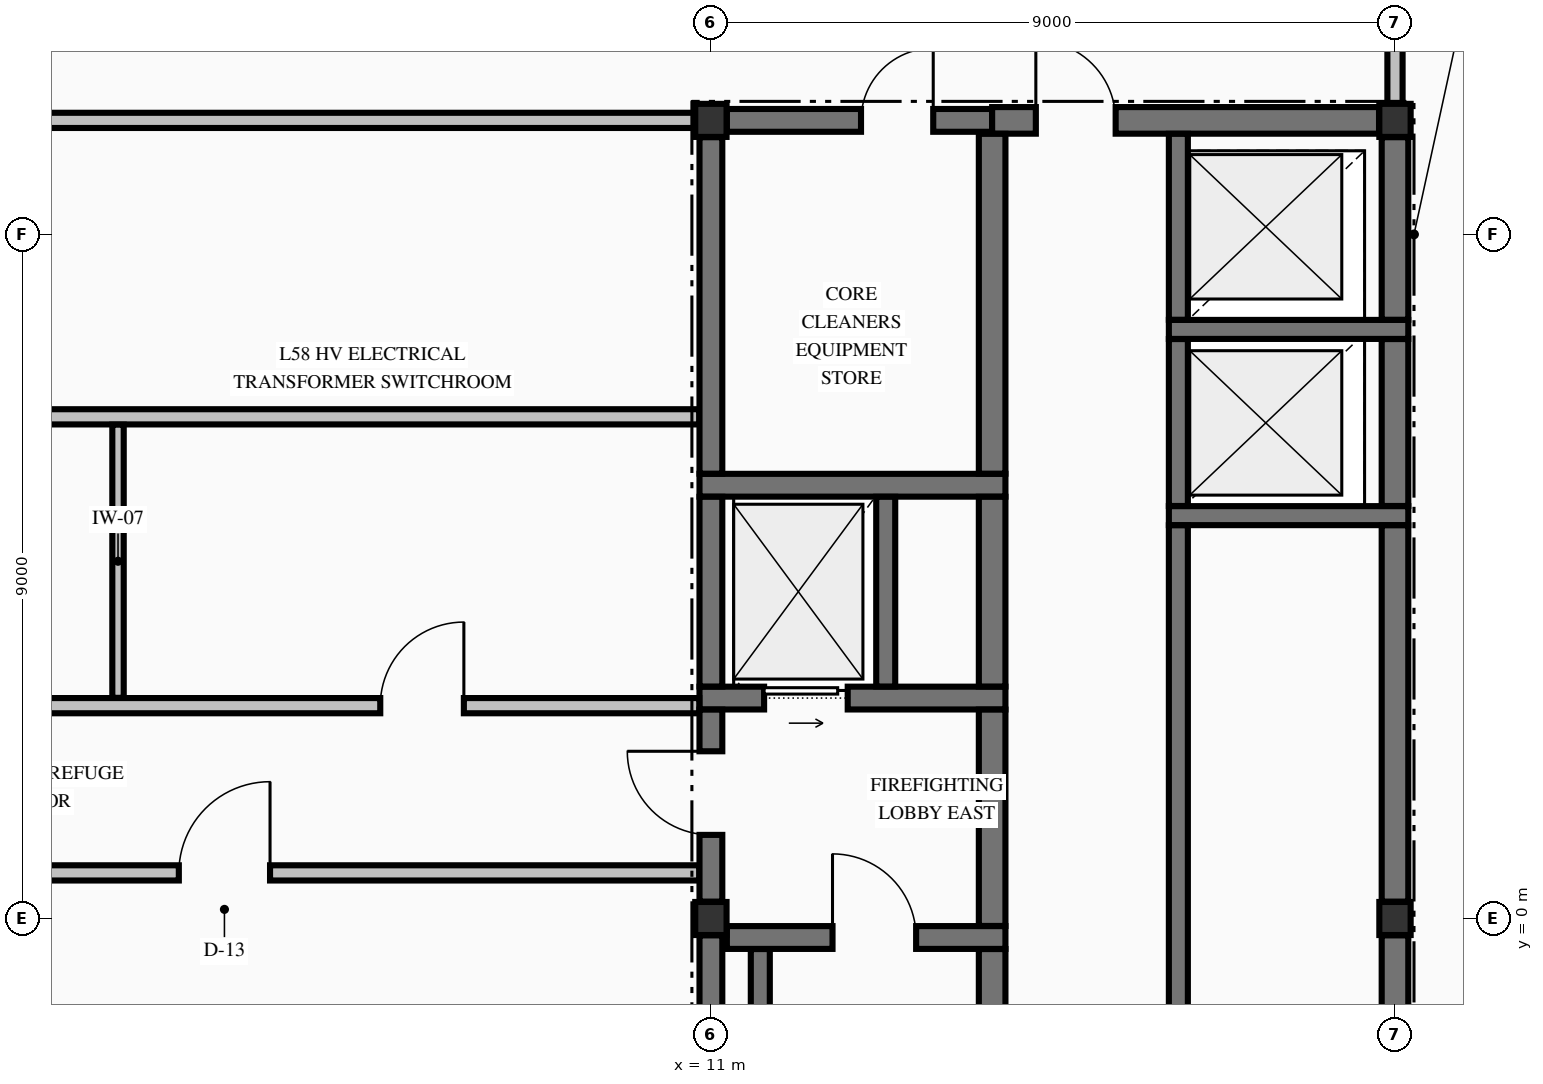
"""IFC4 building model, lengths in metres.
Left out: names, types, materials, properties, quantities, classifications, styles, units other than length and angle.
Written with IfcOpenShell. Run it as: python <this file> out.ifc"""

import sys

from ifc_helpers import new_model, si_unit, direction, frame, frame_2d, origin, origin_2d, place, context, subcontext, project, spatial, rectangle, i_section, extrude, element, fill, save


model = new_model("IFC4")
c1 = context("Model", 3, precision=1e-05, world=origin(), true_north=direction((0.0, 1.0)))
c2 = subcontext(c1, "Body", "Model", "MODEL_VIEW")
j1 = project(units=[si_unit("LENGTHUNIT", "METRE"), si_unit("PLANEANGLEUNIT", "RADIAN")], contexts=[c1])
p1 = place(None, origin())
s1 = spatial("IfcSite", under=j1, at=p1, CompositionType="ELEMENT")
p2 = place(p1, origin())
s2 = spatial("IfcBuilding", under=s1, at=p2, CompositionType="ELEMENT")
p3 = place(p2, frame((0.0, 0.0, 222.06)))
s3 = spatial("IfcBuildingStorey", under=s2, at=p3, CompositionType="ELEMENT", Elevation=222.06)
for number, where, z_axis, x_axis in (
    (1, (11.0, 0.0, -0.425), (0.0, 0.0, 1.0), (1.0, 0.0, 0.0)),
    (2, (11.0, 10.5, -0.425), (0.0, 0.0, 1.0), (1.0, 0.0, 0.0)),
    (3, (20.0, 10.5, -0.425), (0.0, 0.0, 1.0), (1.0, 0.0, 0.0)),
    (4, (20.0, 0.0, -0.425), (0.0, 0.0, 1.0), (1.0, 0.0, 0.0)),
):
    element("IfcColumn", number, at=place(p3, frame(where, z_axis=z_axis, x_axis=x_axis)), inside=s3, PredefinedType="COLUMN", context=c2, shape_type="SweptSolid", body=[
        extrude(i_section(OverallWidth=0.412, OverallDepth=0.435, WebThickness=0.036, FlangeThickness=0.058, FilletRadius=0.015, at=origin_2d()), origin(), (0.0, 0.0, 1.0), 4.76),
    ])
p4 = place(p3, frame((11.21, -0.25, 0.0), z_axis=(0.0, 0.0, 1.0), x_axis=(1.0, 0.0, 0.0)))
e5 = element("IfcWall", 5, at=p4, inside=s3, PredefinedType="SHEAR", context=c2, shape_type="SweptSolid", body=[
    extrude(rectangle(XDim=3.665, YDim=0.3, at=frame_2d((1.833, 0.0))), origin(), (0.0, 0.0, 1.0), 4.335),
])
p5 = place(p4, frame((1.39, 0.0, 0.0)))
e6 = element("IfcOpeningElement", 6, at=p5, cuts=e5, PredefinedType="OPENING", context=c2, shape_type="SweptSolid", body=[
    extrude(rectangle(XDim=1.1, YDim=2.15, at=frame_2d((0.55, 1.075))), frame((0.0, 0.16, 0.0), z_axis=(0.0, -1.0, 0.0), x_axis=(1.0, 0.0, 0.0)), (0.0, 0.0, 1.0), 0.32),
])
p6 = place(p3, frame((10.85, 2.9, 0.0), z_axis=(0.0, 0.0, 1.0), x_axis=(1.0, 0.0, 0.0)))
e7 = element("IfcWall", 7, at=p6, inside=s3, PredefinedType="SHEAR", context=c2, shape_type="SweptSolid", body=[
    extrude(rectangle(XDim=4.025, YDim=0.3, at=frame_2d((2.012, 0.0))), origin(), (0.0, 0.0, 1.0), 4.335),
])
p7 = place(p6, frame((0.85, 0.0, 0.0)))
e8 = element("IfcOpeningElement", 8, at=p7, cuts=e7, PredefinedType="OPENING", context=c2, shape_type="SweptSolid", body=[
    extrude(rectangle(XDim=1.1, YDim=2.2, at=frame_2d((0.55, 1.1))), frame((0.0, 0.16, 0.0), z_axis=(0.0, -1.0, 0.0), x_axis=(1.0, 0.0, 0.0)), (0.0, 0.0, 1.0), 0.32),
])
p8 = place(p3, frame((17.025, 5.3, 0.0), z_axis=(0.0, 0.0, 1.0), x_axis=(1.0, 0.0, 0.0)))
e9 = element("IfcWall", 9, at=p8, inside=s3, PredefinedType="SOLIDWALL", context=c2, shape_type="SweptSolid", body=[
    extrude(rectangle(XDim=3.15, YDim=0.25, at=frame_2d((1.575, 0.0))), origin(), (0.0, 0.0, 1.0), 4.335),
])
p9 = place(p3, frame((10.85, 5.7, 0.0), z_axis=(0.0, 0.0, 1.0), x_axis=(1.0, 0.0, 0.0)))
e10 = element("IfcWall", 10, at=p9, inside=s3, PredefinedType="SHEAR", context=c2, shape_type="SweptSolid", body=[
    extrude(rectangle(XDim=4.025, YDim=0.3, at=frame_2d((2.012, 0.0))), origin(), (0.0, 0.0, 1.0), 4.335),
])
p10 = place(p3, frame((17.025, 7.75, 0.0), z_axis=(0.0, 0.0, 1.0), x_axis=(1.0, 0.0, 0.0)))
e11 = element("IfcWall", 11, at=p10, inside=s3, PredefinedType="SOLIDWALL", context=c2, shape_type="SweptSolid", body=[
    extrude(rectangle(XDim=3.15, YDim=0.25, at=frame_2d((1.575, 0.0))), origin(), (0.0, 0.0, 1.0), 4.335),
])
p11 = place(p3, frame((11.21, 10.5, 0.0), z_axis=(0.0, 0.0, 1.0), x_axis=(1.0, 0.0, 0.0)))
e12 = element("IfcWall", 12, at=p11, inside=s3, PredefinedType="SHEAR", context=c2, shape_type="SweptSolid", body=[
    extrude(rectangle(XDim=3.49, YDim=0.3, at=frame_2d((1.745, 0.0))), origin(), (0.0, 0.0, 1.0), 4.335),
])
p12 = place(p11, frame((1.765, 0.0, 0.0)))
e13 = element("IfcOpeningElement", 13, at=p12, cuts=e12, PredefinedType="OPENING", context=c2, shape_type="SweptSolid", body=[
    extrude(rectangle(XDim=0.95, YDim=2.15, at=frame_2d((0.475, 1.075))), frame((0.0, 0.16, 0.0), z_axis=(0.0, -1.0, 0.0), x_axis=(1.0, 0.0, 0.0)), (0.0, 0.0, 1.0), 0.32),
])
p13 = place(p3, frame((14.7, 10.5, 0.0), z_axis=(0.0, 0.0, 1.0), x_axis=(1.0, 0.0, 0.0)))
e14 = element("IfcWall", 14, at=p13, inside=s3, PredefinedType="SHEAR", context=c2, shape_type="SweptSolid", body=[
    extrude(rectangle(XDim=5.09, YDim=0.35, at=frame_2d((2.545, 0.0))), origin(), (0.0, 0.0, 1.0), 4.335),
])
p14 = place(p13, frame((0.575, 0.0, 0.0)))
e15 = element("IfcOpeningElement", 15, at=p14, cuts=e14, PredefinedType="OPENING", context=c2, shape_type="SweptSolid", body=[
    extrude(rectangle(XDim=1.05, YDim=2.15, at=frame_2d((0.525, 1.075))), frame((0.0, 0.185, 0.0), z_axis=(0.0, -1.0, 0.0), x_axis=(1.0, 0.0, 0.0)), (0.0, 0.0, 1.0), 0.37),
])
p15 = place(p3, frame((-10.847, 0.6, 0.0), z_axis=(0.0, 0.0, 1.0), x_axis=(1.0, 0.0, 0.0)))
e16 = element("IfcWall", 16, at=p15, inside=s3, PredefinedType="PARTITIONING", context=c2, shape_type="SweptSolid", body=[
    extrude(rectangle(XDim=21.694, YDim=0.2, at=frame_2d((10.847, 0.0))), origin(), (0.0, 0.0, 1.0), 4.335),
])
p16 = place(p15, frame((7.297, 0.0, 0.0)))
e17 = element("IfcOpeningElement", 17, at=p16, cuts=e16, PredefinedType="OPENING", context=c2, shape_type="SweptSolid", body=[
    extrude(rectangle(XDim=1.1, YDim=2.15, at=frame_2d((0.55, 1.075))), frame((0.0, 0.11, 0.0), z_axis=(0.0, -1.0, 0.0), x_axis=(1.0, 0.0, 0.0)), (0.0, 0.0, 1.0), 0.22),
])
p17 = place(p15, frame((2.647, 0.0, 0.0)))
e18 = element("IfcOpeningElement", 18, at=p17, cuts=e16, PredefinedType="OPENING", context=c2, shape_type="SweptSolid", body=[
    extrude(rectangle(XDim=1.2, YDim=2.15, at=frame_2d((0.6, 1.075))), frame((0.0, 0.11, 0.0), z_axis=(0.0, -1.0, 0.0), x_axis=(1.0, 0.0, 0.0)), (0.0, 0.0, 1.0), 0.22),
])
p18 = place(p15, frame((14.847, 0.0, 0.0)))
e19 = element("IfcOpeningElement", 19, at=p18, cuts=e16, PredefinedType="OPENING", context=c2, shape_type="SweptSolid", body=[
    extrude(rectangle(XDim=1.2, YDim=2.15, at=frame_2d((0.6, 1.075))), frame((0.0, 0.11, 0.0), z_axis=(0.0, -1.0, 0.0), x_axis=(1.0, 0.0, 0.0)), (0.0, 0.0, 1.0), 0.22),
])
p19 = place(p3, frame((-10.847, 2.8, 0.0), z_axis=(0.0, 0.0, 1.0), x_axis=(1.0, 0.0, 0.0)))
e20 = element("IfcWall", 20, at=p19, inside=s3, PredefinedType="PARTITIONING", context=c2, shape_type="SweptSolid", body=[
    extrude(rectangle(XDim=21.694, YDim=0.2, at=frame_2d((10.847, 0.0))), origin(), (0.0, 0.0, 1.0), 4.335),
])
p20 = place(p19, frame((7.297, 0.0, 0.0)))
e21 = element("IfcOpeningElement", 21, at=p20, cuts=e20, PredefinedType="OPENING", context=c2, shape_type="SweptSolid", body=[
    extrude(rectangle(XDim=1.1, YDim=2.15, at=frame_2d((0.55, 1.075))), frame((0.0, 0.11, 0.0), z_axis=(0.0, -1.0, 0.0), x_axis=(1.0, 0.0, 0.0)), (0.0, 0.0, 1.0), 0.22),
])
p21 = place(p19, frame((17.497, 0.0, 0.0)))
e22 = element("IfcOpeningElement", 22, at=p21, cuts=e20, PredefinedType="OPENING", context=c2, shape_type="SweptSolid", body=[
    extrude(rectangle(XDim=1.1, YDim=2.15, at=frame_2d((0.55, 1.075))), frame((0.0, 0.11, 0.0), z_axis=(0.0, -1.0, 0.0), x_axis=(1.0, 0.0, 0.0)), (0.0, 0.0, 1.0), 0.22),
])
p22 = place(p3, frame((-1.9, 6.6, 0.0), z_axis=(0.0, 0.0, 1.0), x_axis=(1.0, 0.0, 0.0)))
e23 = element("IfcWall", 23, at=p22, inside=s3, PredefinedType="PARTITIONING", context=c2, shape_type="SweptSolid", body=[
    extrude(rectangle(XDim=12.747, YDim=0.2, at=frame_2d((6.374, 0.0))), origin(), (0.0, 0.0, 1.0), 4.335),
])
p23 = place(p3, frame((-10.788, 10.5, 0.0), z_axis=(0.0, 0.0, 1.0), x_axis=(1.0, 0.0, 0.0)))
e24 = element("IfcWall", 24, at=p23, inside=s3, PredefinedType="PARTITIONING", context=c2, shape_type="SweptSolid", body=[
    extrude(rectangle(XDim=21.576, YDim=0.2, at=frame_2d((10.788, 0.0))), origin(), (0.0, 0.0, 1.0), 4.335),
])
p24 = place(p23, frame((7.238, 0.0, 0.0)))
e25 = element("IfcOpeningElement", 25, at=p24, cuts=e24, PredefinedType="OPENING", context=c2, shape_type="SweptSolid", body=[
    extrude(rectangle(XDim=1.1, YDim=2.15, at=frame_2d((0.55, 1.075))), frame((0.0, 0.11, 0.0), z_axis=(0.0, -1.0, 0.0), x_axis=(1.0, 0.0, 0.0)), (0.0, 0.0, 1.0), 0.22),
])
p25 = place(p3, frame((11.0, -9.729, 0.0), z_axis=(0.0, 0.0, 1.0), x_axis=(0.0, 1.0, 0.0)))
e26 = element("IfcWall", 26, at=p25, inside=s3, PredefinedType="SHEAR", context=c2, shape_type="SweptSolid", body=[
    extrude(rectangle(XDim=9.507, YDim=0.3, at=frame_2d((4.753, 0.0))), origin(), (0.0, 0.0, 1.0), 4.335),
])
p26 = place(p3, frame((11.0, 0.221, 0.0), z_axis=(0.0, 0.0, 1.0), x_axis=(0.0, 1.0, 0.0)))
e27 = element("IfcWall", 27, at=p26, inside=s3, PredefinedType="SHEAR", context=c2, shape_type="SweptSolid", body=[
    extrude(rectangle(XDim=2.527, YDim=0.3, at=frame_2d((1.263, 0.0))), origin(), (0.0, 0.0, 1.0), 4.335),
])
p27 = place(p26, frame((0.878, 0.0, 0.0)))
e28 = element("IfcOpeningElement", 28, at=p27, cuts=e27, PredefinedType="OPENING", context=c2, shape_type="SweptSolid", body=[
    extrude(rectangle(XDim=1.1, YDim=2.15, at=frame_2d((0.55, 1.075))), frame((0.0, 0.16, 0.0), z_axis=(0.0, -1.0, 0.0), x_axis=(1.0, 0.0, 0.0)), (0.0, 0.0, 1.0), 0.32),
])
p28 = place(p3, frame((11.0, 3.052, 0.0), z_axis=(0.0, 0.0, 1.0), x_axis=(0.0, 1.0, 0.0)))
e29 = element("IfcWall", 29, at=p28, inside=s3, PredefinedType="SHEAR", context=c2, shape_type="SweptSolid", body=[
    extrude(rectangle(XDim=2.496, YDim=0.3, at=frame_2d((1.248, 0.0))), origin(), (0.0, 0.0, 1.0), 4.335),
])
p29 = place(p3, frame((11.0, 5.852, 0.0), z_axis=(0.0, 0.0, 1.0), x_axis=(0.0, 1.0, 0.0)))
e30 = element("IfcWall", 30, at=p29, inside=s3, PredefinedType="SHEAR", context=c2, shape_type="SweptSolid", body=[
    extrude(rectangle(XDim=4.427, YDim=0.3, at=frame_2d((2.213, 0.0))), origin(), (0.0, 0.0, 1.0), 4.335),
])
p30 = place(p3, frame((11.65, -9.798, 0.0), z_axis=(0.0, 0.0, 1.0), x_axis=(0.0, 1.0, 0.0)))
e31 = element("IfcWall", 31, at=p30, inside=s3, PredefinedType="SOLIDWALL", context=c2, shape_type="SweptSolid", body=[
    extrude(rectangle(XDim=9.396, YDim=0.25, at=frame_2d((4.698, 0.0))), origin(), (0.0, 0.0, 1.0), 4.335),
])
p31 = place(p3, frame((13.3, 3.052, 0.0), z_axis=(0.0, 0.0, 1.0), x_axis=(0.0, 1.0, 0.0)))
e32 = element("IfcWall", 32, at=p31, inside=s3, PredefinedType="SOLIDWALL", context=c2, shape_type="SweptSolid", body=[
    extrude(rectangle(XDim=2.496, YDim=0.25, at=frame_2d((1.248, 0.0))), origin(), (0.0, 0.0, 1.0), 4.335),
])
p32 = place(p3, frame((14.7, -9.773, 0.0), z_axis=(0.0, 0.0, 1.0), x_axis=(0.0, 1.0, 0.0)))
e33 = element("IfcWall", 33, at=p32, inside=s3, PredefinedType="SHEAR", context=c2, shape_type="SweptSolid", body=[
    extrude(rectangle(XDim=9.371, YDim=0.35, at=frame_2d((4.686, 0.0))), origin(), (0.0, 0.0, 1.0), 4.335),
])
p33 = place(p3, frame((14.7, -0.098, 0.0), z_axis=(0.0, 0.0, 1.0), x_axis=(0.0, 1.0, 0.0)))
e34 = element("IfcWall", 34, at=p33, inside=s3, PredefinedType="SHEAR", context=c2, shape_type="SweptSolid", body=[
    extrude(rectangle(XDim=2.846, YDim=0.35, at=frame_2d((1.423, 0.0))), origin(), (0.0, 0.0, 1.0), 4.335),
])
p34 = place(p3, frame((14.7, 3.052, 0.0), z_axis=(0.0, 0.0, 1.0), x_axis=(0.0, 1.0, 0.0)))
e35 = element("IfcWall", 35, at=p34, inside=s3, PredefinedType="SHEAR", context=c2, shape_type="SweptSolid", body=[
    extrude(rectangle(XDim=2.496, YDim=0.35, at=frame_2d((1.248, 0.0))), origin(), (0.0, 0.0, 1.0), 4.335),
])
p35 = place(p3, frame((14.7, 5.852, 0.0), z_axis=(0.0, 0.0, 1.0), x_axis=(0.0, 1.0, 0.0)))
e36 = element("IfcWall", 36, at=p35, inside=s3, PredefinedType="SHEAR", context=c2, shape_type="SweptSolid", body=[
    extrude(rectangle(XDim=4.471, YDim=0.35, at=frame_2d((2.235, 0.0))), origin(), (0.0, 0.0, 1.0), 4.335),
])
p36 = place(p3, frame((17.15, -9.773, 0.0), z_axis=(0.0, 0.0, 1.0), x_axis=(0.0, 1.0, 0.0)))
e37 = element("IfcWall", 37, at=p36, inside=s3, PredefinedType="SOLIDWALL", context=c2, shape_type="SweptSolid", body=[
    extrude(rectangle(XDim=14.946, YDim=0.25, at=frame_2d((7.473, 0.0))), origin(), (0.0, 0.0, 1.0), 4.335),
])
p37 = place(p3, frame((17.15, 5.427, 0.0), z_axis=(0.0, 0.0, 1.0), x_axis=(0.0, 1.0, 0.0)))
e38 = element("IfcWall", 38, at=p37, inside=s3, PredefinedType="SOLIDWALL", context=c2, shape_type="SweptSolid", body=[
    extrude(rectangle(XDim=2.196, YDim=0.25, at=frame_2d((1.098, 0.0))), origin(), (0.0, 0.0, 1.0), 4.335),
])
p38 = place(p3, frame((17.15, 7.877, 0.0), z_axis=(0.0, 0.0, 1.0), x_axis=(0.0, 1.0, 0.0)))
e39 = element("IfcWall", 39, at=p38, inside=s3, PredefinedType="SOLIDWALL", context=c2, shape_type="SweptSolid", body=[
    extrude(rectangle(XDim=2.446, YDim=0.25, at=frame_2d((1.223, 0.0))), origin(), (0.0, 0.0, 1.0), 4.335),
])
p39 = place(p3, frame((20.0, -9.729, 0.0), z_axis=(0.0, 0.0, 1.0), x_axis=(0.0, 1.0, 0.0)))
e40 = element("IfcWall", 40, at=p39, inside=s3, PredefinedType="SHEAR", context=c2, shape_type="SweptSolid", body=[
    extrude(rectangle(XDim=9.507, YDim=0.35, at=frame_2d((4.753, 0.0))), origin(), (0.0, 0.0, 1.0), 4.335),
])
p40 = place(p3, frame((20.0, 0.221, 0.0), z_axis=(0.0, 0.0, 1.0), x_axis=(0.0, 1.0, 0.0)))
e41 = element("IfcWall", 41, at=p40, inside=s3, PredefinedType="SHEAR", context=c2, shape_type="SweptSolid", body=[
    extrude(rectangle(XDim=4.952, YDim=0.35, at=frame_2d((2.476, 0.0))), origin(), (0.0, 0.0, 1.0), 4.335),
])
p41 = place(p3, frame((20.0, 5.427, 0.0), z_axis=(0.0, 0.0, 1.0), x_axis=(0.0, 1.0, 0.0)))
e42 = element("IfcWall", 42, at=p41, inside=s3, PredefinedType="SHEAR", context=c2, shape_type="SweptSolid", body=[
    extrude(rectangle(XDim=2.196, YDim=0.35, at=frame_2d((1.098, 0.0))), origin(), (0.0, 0.0, 1.0), 4.335),
])
p42 = place(p3, frame((20.0, 7.877, 0.0), z_axis=(0.0, 0.0, 1.0), x_axis=(0.0, 1.0, 0.0)))
e43 = element("IfcWall", 43, at=p42, inside=s3, PredefinedType="SHEAR", context=c2, shape_type="SweptSolid", body=[
    extrude(rectangle(XDim=2.402, YDim=0.35, at=frame_2d((1.201, 0.0))), origin(), (0.0, 0.0, 1.0), 4.335),
])
p43 = place(p3, frame((3.2, 2.903, 0.0), z_axis=(0.0, 0.0, 1.0), x_axis=(0.0, 1.0, 0.0)))
e44 = element("IfcWall", 44, at=p43, inside=s3, PredefinedType="PARTITIONING", context=c2, shape_type="SweptSolid", body=[
    extrude(rectangle(XDim=3.594, YDim=0.15, at=frame_2d((1.797, 0.0))), origin(), (0.0, 0.0, 1.0), 4.335),
])
p44 = place(p3, frame((20.0, 10.723, 0.0), z_axis=(0.0, 0.0, 1.0), x_axis=(0.0, 1.0, 0.0)))
e45 = element("IfcWall", 45, at=p44, inside=s3, PredefinedType="PARTITIONING", context=c2, shape_type="SweptSolid", body=[
    extrude(rectangle(XDim=1.974, YDim=0.2, at=frame_2d((0.987, 0.0))), origin(), (0.0, 0.0, 1.0), 4.335),
])
p45 = place(p5, origin())
e46 = element("IfcDoor", 46, at=p45, inside=s3, OperationType="SINGLE_SWING_LEFT", PredefinedType="DOOR", context=c2, shape_type="SweptSolid", body=[
    extrude(rectangle(XDim=1.1, YDim=2.15, at=frame_2d((0.55, 1.075))), frame((0.0, 0.025, 0.0), z_axis=(0.0, -1.0, 0.0), x_axis=(1.0, 0.0, 0.0)), (0.0, 0.0, 1.0), 0.05),
])
fill(e6, e46)
p46 = place(p27, origin())
e47 = element("IfcDoor", 47, at=p46, inside=s3, OperationType="SINGLE_SWING_RIGHT", PredefinedType="DOOR", context=c2, shape_type="SweptSolid", body=[
    extrude(rectangle(XDim=1.1, YDim=2.15, at=frame_2d((0.55, 1.075))), frame((0.0, 0.025, 0.0), z_axis=(0.0, -1.0, 0.0), x_axis=(1.0, 0.0, 0.0)), (0.0, 0.0, 1.0), 0.05),
])
fill(e28, e47)
p47 = place(p7, origin())
e48 = element("IfcDoor", 48, at=p47, inside=s3, OperationType="SLIDING_TO_RIGHT", PredefinedType="DOOR", context=c2, shape_type="SweptSolid", body=[
    extrude(rectangle(XDim=1.1, YDim=2.2, at=frame_2d((0.55, 1.1))), frame((0.0, 0.025, 0.0), z_axis=(0.0, -1.0, 0.0), x_axis=(1.0, 0.0, 0.0)), (0.0, 0.0, 1.0), 0.05),
])
fill(e8, e48)
p48 = place(p12, origin())
e49 = element("IfcDoor", 49, at=p48, inside=s3, OperationType="SINGLE_SWING_RIGHT", PredefinedType="DOOR", context=c2, shape_type="SweptSolid", body=[
    extrude(rectangle(XDim=0.95, YDim=2.15, at=frame_2d((0.475, 1.075))), frame((0.0, 0.025, 0.0), z_axis=(0.0, -1.0, 0.0), x_axis=(1.0, 0.0, 0.0)), (0.0, 0.0, 1.0), 0.05),
])
fill(e13, e49)
p49 = place(p14, origin())
e50 = element("IfcDoor", 50, at=p49, inside=s3, OperationType="SINGLE_SWING_LEFT", PredefinedType="DOOR", context=c2, shape_type="SweptSolid", body=[
    extrude(rectangle(XDim=1.05, YDim=2.15, at=frame_2d((0.525, 1.075))), frame((0.0, 0.025, 0.0), z_axis=(0.0, -1.0, 0.0), x_axis=(1.0, 0.0, 0.0)), (0.0, 0.0, 1.0), 0.05),
])
fill(e15, e50)
p50 = place(p18, origin())
e51 = element("IfcDoor", 51, at=p50, inside=s3, OperationType="SINGLE_SWING_RIGHT", PredefinedType="DOOR", context=c2, shape_type="SweptSolid", body=[
    extrude(rectangle(XDim=1.2, YDim=2.15, at=frame_2d((0.6, 1.075))), frame((0.0, 0.025, 0.0), z_axis=(0.0, -1.0, 0.0), x_axis=(1.0, 0.0, 0.0)), (0.0, 0.0, 1.0), 0.05),
])
fill(e19, e51)
p51 = place(p21, origin())
e52 = element("IfcDoor", 52, at=p51, inside=s3, OperationType="SINGLE_SWING_RIGHT", PredefinedType="DOOR", context=c2, shape_type="SweptSolid", body=[
    extrude(rectangle(XDim=1.1, YDim=2.15, at=frame_2d((0.55, 1.075))), frame((0.0, 0.025, 0.0), z_axis=(0.0, -1.0, 0.0), x_axis=(1.0, 0.0, 0.0)), (0.0, 0.0, 1.0), 0.05),
])
fill(e22, e52)
save(model, sys.argv[1])
